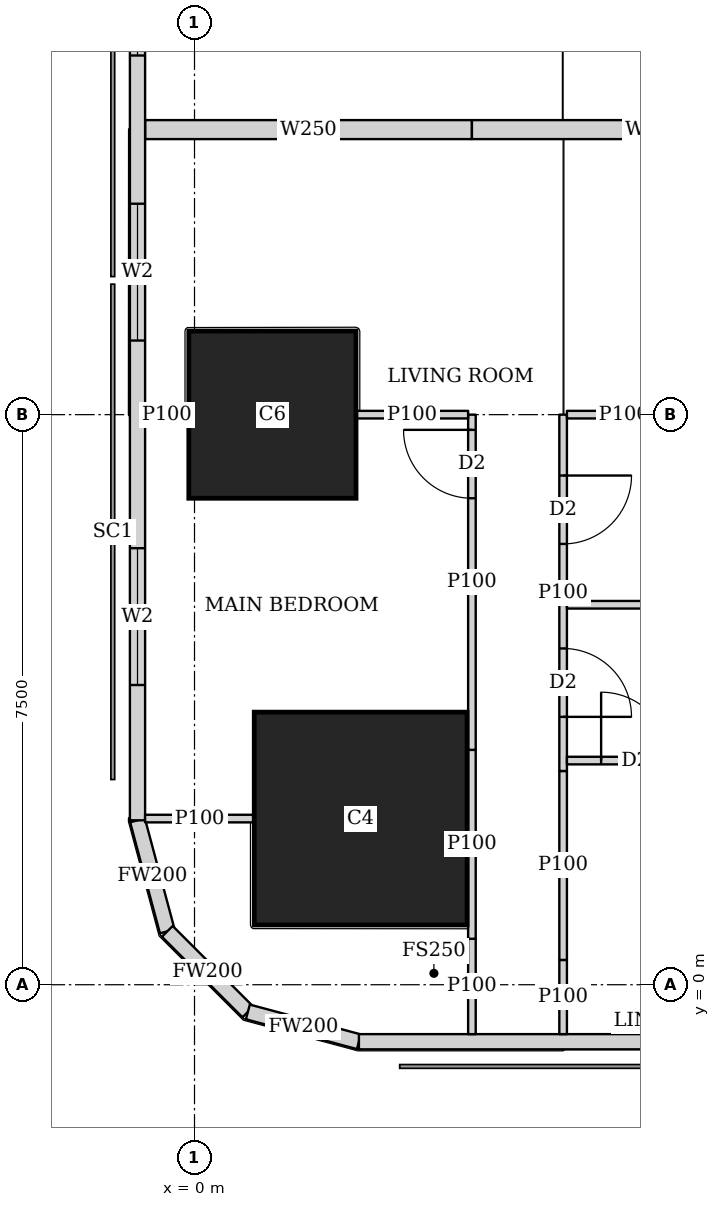
"""IFC4 building model, lengths in metres.
Left out: names, types, materials, properties, quantities, classifications, styles, units other than length and angle.
Written with IfcOpenShell. Run it as: python <this file> out.ifc"""

import sys

from ifc_helpers import new_model, si_unit, direction, frame, frame_2d, origin, origin_2d, place, context, subcontext, project, spatial, rectangle, extrude, element, fill, save


model = new_model("IFC4")
c1 = context("Model", 3, precision=1e-05, world=origin(), true_north=direction((0.0, 1.0)))
c2 = subcontext(c1, "Body", "Model", "MODEL_VIEW")
j1 = project(units=[si_unit("LENGTHUNIT", "METRE"), si_unit("PLANEANGLEUNIT", "RADIAN")], contexts=[c1])
p1 = place(None, origin())
s1 = spatial("IfcSite", under=j1, at=p1, CompositionType="ELEMENT")
p2 = place(p1, origin())
s2 = spatial("IfcBuilding", under=s1, at=p2, CompositionType="ELEMENT")
p3 = place(p2, frame((0.0, 0.0, 111.65)))
s3 = spatial("IfcBuildingStorey", under=s2, at=p3, CompositionType="ELEMENT", Elevation=111.65)
p4 = place(p3, frame((2.186, 2.186, 0.0), z_axis=(0.0, 0.0, 1.0), x_axis=(1.0, 0.0, 0.0)))
e1 = element("IfcColumn", 1, at=p4, inside=s3, PredefinedType="COLUMN", context=c2, shape_type="SweptSolid", body=[
    extrude(rectangle(XDim=2.8, YDim=2.8, at=origin_2d()), origin(), (0.0, 0.0, 1.0), 3.75),
])
p5 = place(p3, frame((1.025, 7.5, 0.0), z_axis=(0.0, 0.0, 1.0), x_axis=(1.0, 0.0, 0.0)))
e2 = element("IfcColumn", 2, at=p5, inside=s3, PredefinedType="COLUMN", context=c2, shape_type="SweptSolid", body=[
    extrude(rectangle(XDim=2.2, YDim=2.2, at=origin_2d()), origin(), (0.0, 0.0, 1.0), 3.75),
])
p6 = place(p3, frame((2.163, -0.75, 0.0), z_axis=(0.0, 0.0, 1.0), x_axis=(1.0, 0.0, 0.0)))
e3 = element("IfcWall", 3, at=p6, inside=s3, PredefinedType="SOLIDWALL", context=c2, shape_type="SweptSolid", body=[
    extrude(rectangle(XDim=45.628, YDim=0.2, at=frame_2d((22.814, 0.0))), origin(), (0.0, 0.0, 1.0), 3.5),
])
p7 = place(p6, frame((9.537, 0.0, 0.9)))
e4 = element("IfcOpeningElement", 4, at=p7, cuts=e3, PredefinedType="OPENING", context=c2, shape_type="SweptSolid", body=[
    extrude(rectangle(XDim=1.8, YDim=1.5, at=frame_2d((0.9, 0.75))), frame((0.0, 0.11, 0.0), z_axis=(0.0, -1.0, 0.0), x_axis=(1.0, 0.0, 0.0)), (0.0, 0.0, 1.0), 0.22),
])
p8 = place(p6, frame((13.137, 0.0, 0.9)))
e5 = element("IfcOpeningElement", 5, at=p8, cuts=e3, PredefinedType="OPENING", context=c2, shape_type="SweptSolid", body=[
    extrude(rectangle(XDim=1.8, YDim=1.5, at=frame_2d((0.9, 0.75))), frame((0.0, 0.11, 0.0), z_axis=(0.0, -1.0, 0.0), x_axis=(1.0, 0.0, 0.0)), (0.0, 0.0, 1.0), 0.22),
])
p9 = place(p6, frame((16.737, 0.0, 0.9)))
e6 = element("IfcOpeningElement", 6, at=p9, cuts=e3, PredefinedType="OPENING", context=c2, shape_type="SweptSolid", body=[
    extrude(rectangle(XDim=1.8, YDim=1.5, at=frame_2d((0.9, 0.75))), frame((0.0, 0.11, 0.0), z_axis=(0.0, -1.0, 0.0), x_axis=(1.0, 0.0, 0.0)), (0.0, 0.0, 1.0), 0.22),
])
p10 = place(p6, frame((20.337, 0.0, 0.9)))
e7 = element("IfcOpeningElement", 7, at=p10, cuts=e3, PredefinedType="OPENING", context=c2, shape_type="SweptSolid", body=[
    extrude(rectangle(XDim=1.8, YDim=1.5, at=frame_2d((0.9, 0.75))), frame((0.0, 0.11, 0.0), z_axis=(0.0, -1.0, 0.0), x_axis=(1.0, 0.0, 0.0)), (0.0, 0.0, 1.0), 0.22),
])
p11 = place(p6, frame((23.937, 0.0, 0.9)))
e8 = element("IfcOpeningElement", 8, at=p11, cuts=e3, PredefinedType="OPENING", context=c2, shape_type="SweptSolid", body=[
    extrude(rectangle(XDim=1.8, YDim=1.5, at=frame_2d((0.9, 0.75))), frame((0.0, 0.11, 0.0), z_axis=(0.0, -1.0, 0.0), x_axis=(1.0, 0.0, 0.0)), (0.0, 0.0, 1.0), 0.22),
])
p12 = place(p6, frame((27.537, 0.0, 0.9)))
e9 = element("IfcOpeningElement", 9, at=p12, cuts=e3, PredefinedType="OPENING", context=c2, shape_type="SweptSolid", body=[
    extrude(rectangle(XDim=1.8, YDim=1.5, at=frame_2d((0.9, 0.75))), frame((0.0, 0.11, 0.0), z_axis=(0.0, -1.0, 0.0), x_axis=(1.0, 0.0, 0.0)), (0.0, 0.0, 1.0), 0.22),
])
p13 = place(p6, frame((31.137, 0.0, 0.9)))
e10 = element("IfcOpeningElement", 10, at=p13, cuts=e3, PredefinedType="OPENING", context=c2, shape_type="SweptSolid", body=[
    extrude(rectangle(XDim=1.8, YDim=1.5, at=frame_2d((0.9, 0.75))), frame((0.0, 0.11, 0.0), z_axis=(0.0, -1.0, 0.0), x_axis=(1.0, 0.0, 0.0)), (0.0, 0.0, 1.0), 0.22),
])
p14 = place(p6, frame((34.737, 0.0, 0.9)))
e11 = element("IfcOpeningElement", 11, at=p14, cuts=e3, PredefinedType="OPENING", context=c2, shape_type="SweptSolid", body=[
    extrude(rectangle(XDim=1.8, YDim=1.5, at=frame_2d((0.9, 0.75))), frame((0.0, 0.11, 0.0), z_axis=(0.0, -1.0, 0.0), x_axis=(1.0, 0.0, 0.0)), (0.0, 0.0, 1.0), 0.22),
])
p15 = place(p3, frame((-0.75, 42.837, 0.0), z_axis=(0.0, 0.0, 1.0), x_axis=(0.0, -1.0, 0.0)))
e12 = element("IfcWall", 12, at=p15, inside=s3, PredefinedType="SOLIDWALL", context=c2, shape_type="SweptSolid", body=[
    extrude(rectangle(XDim=40.674, YDim=0.2, at=frame_2d((20.337, 0.0))), origin(), (0.0, 0.0, 1.0), 3.5),
])
p16 = place(p15, frame((1.78, 0.0, 0.9)))
e13 = element("IfcOpeningElement", 13, at=p16, cuts=e12, PredefinedType="OPENING", context=c2, shape_type="SweptSolid", body=[
    extrude(rectangle(XDim=1.8, YDim=1.5, at=frame_2d((0.9, 0.75))), frame((0.0, 0.11, 0.0), z_axis=(0.0, -1.0, 0.0), x_axis=(1.0, 0.0, 0.0)), (0.0, 0.0, 1.0), 0.22),
])
p17 = place(p15, frame((6.312, 0.0, 0.9)))
e14 = element("IfcOpeningElement", 14, at=p17, cuts=e12, PredefinedType="OPENING", context=c2, shape_type="SweptSolid", body=[
    extrude(rectangle(XDim=1.8, YDim=1.5, at=frame_2d((0.9, 0.75))), frame((0.0, 0.11, 0.0), z_axis=(0.0, -1.0, 0.0), x_axis=(1.0, 0.0, 0.0)), (0.0, 0.0, 1.0), 0.22),
])
p18 = place(p15, frame((10.062, 0.0, 0.9)))
e15 = element("IfcOpeningElement", 15, at=p18, cuts=e12, PredefinedType="OPENING", context=c2, shape_type="SweptSolid", body=[
    extrude(rectangle(XDim=1.8, YDim=1.5, at=frame_2d((0.9, 0.75))), frame((0.0, 0.11, 0.0), z_axis=(0.0, -1.0, 0.0), x_axis=(1.0, 0.0, 0.0)), (0.0, 0.0, 1.0), 0.22),
])
p19 = place(p15, frame((13.812, 0.0, 0.9)))
e16 = element("IfcOpeningElement", 16, at=p19, cuts=e12, PredefinedType="OPENING", context=c2, shape_type="SweptSolid", body=[
    extrude(rectangle(XDim=1.8, YDim=1.5, at=frame_2d((0.9, 0.75))), frame((0.0, 0.11, 0.0), z_axis=(0.0, -1.0, 0.0), x_axis=(1.0, 0.0, 0.0)), (0.0, 0.0, 1.0), 0.22),
])
p20 = place(p15, frame((17.562, 0.0, 0.9)))
e17 = element("IfcOpeningElement", 17, at=p20, cuts=e12, PredefinedType="OPENING", context=c2, shape_type="SweptSolid", body=[
    extrude(rectangle(XDim=1.8, YDim=1.5, at=frame_2d((0.9, 0.75))), frame((0.0, 0.11, 0.0), z_axis=(0.0, -1.0, 0.0), x_axis=(1.0, 0.0, 0.0)), (0.0, 0.0, 1.0), 0.22),
])
p21 = place(p15, frame((21.312, 0.0, 0.9)))
e18 = element("IfcOpeningElement", 18, at=p21, cuts=e12, PredefinedType="OPENING", context=c2, shape_type="SweptSolid", body=[
    extrude(rectangle(XDim=1.8, YDim=1.5, at=frame_2d((0.9, 0.75))), frame((0.0, 0.11, 0.0), z_axis=(0.0, -1.0, 0.0), x_axis=(1.0, 0.0, 0.0)), (0.0, 0.0, 1.0), 0.22),
])
p22 = place(p15, frame((25.062, 0.0, 0.9)))
e19 = element("IfcOpeningElement", 19, at=p22, cuts=e12, PredefinedType="OPENING", context=c2, shape_type="SweptSolid", body=[
    extrude(rectangle(XDim=1.8, YDim=1.5, at=frame_2d((0.9, 0.75))), frame((0.0, 0.11, 0.0), z_axis=(0.0, -1.0, 0.0), x_axis=(1.0, 0.0, 0.0)), (0.0, 0.0, 1.0), 0.22),
])
p23 = place(p15, frame((28.812, 0.0, 0.9)))
e20 = element("IfcOpeningElement", 20, at=p23, cuts=e12, PredefinedType="OPENING", context=c2, shape_type="SweptSolid", body=[
    extrude(rectangle(XDim=1.8, YDim=1.5, at=frame_2d((0.9, 0.75))), frame((0.0, 0.11, 0.0), z_axis=(0.0, -1.0, 0.0), x_axis=(1.0, 0.0, 0.0)), (0.0, 0.0, 1.0), 0.22),
])
p24 = place(p15, frame((32.562, 0.0, 0.9)))
e21 = element("IfcOpeningElement", 21, at=p24, cuts=e12, PredefinedType="OPENING", context=c2, shape_type="SweptSolid", body=[
    extrude(rectangle(XDim=1.8, YDim=1.5, at=frame_2d((0.9, 0.75))), frame((0.0, 0.11, 0.0), z_axis=(0.0, -1.0, 0.0), x_axis=(1.0, 0.0, 0.0)), (0.0, 0.0, 1.0), 0.22),
])
p25 = place(p15, frame((37.094, 0.0, 0.9)))
e22 = element("IfcOpeningElement", 22, at=p25, cuts=e12, PredefinedType="OPENING", context=c2, shape_type="SweptSolid", body=[
    extrude(rectangle(XDim=1.8, YDim=1.5, at=frame_2d((0.9, 0.75))), frame((0.0, 0.11, 0.0), z_axis=(0.0, -1.0, 0.0), x_axis=(1.0, 0.0, 0.0)), (0.0, 0.0, 1.0), 0.22),
])
p26 = place(p3, frame((-0.75, 2.163, 0.0), z_axis=(0.0, 0.0, 1.0), x_axis=(0.259168954497, -0.965832000415, 0.0)))
e23 = element("IfcWall", 23, at=p26, inside=s3, PredefinedType="SOLIDWALL", context=c2, shape_type="SweptSolid", body=[
    extrude(rectangle(XDim=1.513, YDim=0.2, at=frame_2d((0.756, 0.0))), origin(), (0.0, 0.0, 1.0), 3.5),
])
p27 = place(p3, frame((-0.358, 0.702, 0.0), z_axis=(0.0, 0.0, 1.0), x_axis=(0.707106781187, -0.707106781187, 0.0)))
e24 = element("IfcWall", 24, at=p27, inside=s3, PredefinedType="SOLIDWALL", context=c2, shape_type="SweptSolid", body=[
    extrude(rectangle(XDim=1.499, YDim=0.2, at=frame_2d((0.75, 0.0))), origin(), (0.0, 0.0, 1.0), 3.5),
])
p28 = place(p3, frame((0.702, -0.358, 0.0), z_axis=(0.0, 0.0, 1.0), x_axis=(0.965832000415, -0.259168954497, 0.0)))
e25 = element("IfcWall", 25, at=p28, inside=s3, PredefinedType="SOLIDWALL", context=c2, shape_type="SweptSolid", body=[
    extrude(rectangle(XDim=1.513, YDim=0.2, at=frame_2d((0.756, 0.0))), origin(), (0.0, 0.0, 1.0), 3.5),
])
p29 = place(p3, frame((3.65, -0.65, 0.0), z_axis=(0.0, 0.0, 1.0), x_axis=(0.0, 1.0, 0.0)))
e26 = element("IfcWall", 26, at=p29, inside=s3, PredefinedType="PARTITIONING", context=c2, shape_type="SweptSolid", body=[
    extrude(rectangle(XDim=1.254, YDim=0.1, at=frame_2d((0.627, 0.0))), origin(), (0.0, 0.0, 1.0), 3.5),
])
p30 = place(p3, frame((3.65, 0.604, 0.0), z_axis=(0.0, 0.0, 1.0), x_axis=(0.0, 1.0, 0.0)))
e27 = element("IfcWall", 27, at=p30, inside=s3, PredefinedType="PARTITIONING", context=c2, shape_type="SweptSolid", body=[
    extrude(rectangle(XDim=2.486, YDim=0.1, at=frame_2d((1.243, 0.0))), origin(), (0.0, 0.0, 1.0), 2.05),
])
p31 = place(p3, frame((3.65, 3.09, 0.0), z_axis=(0.0, 0.0, 1.0), x_axis=(0.0, 1.0, 0.0)))
e28 = element("IfcWall", 28, at=p31, inside=s3, PredefinedType="PARTITIONING", context=c2, shape_type="SweptSolid", body=[
    extrude(rectangle(XDim=4.41, YDim=0.1, at=frame_2d((2.205, 0.0))), origin(), (0.0, 0.0, 1.0), 3.5),
])
p32 = place(p31, frame((3.31, 0.0, 0.0)))
e29 = element("IfcOpeningElement", 29, at=p32, cuts=e28, PredefinedType="OPENING", context=c2, shape_type="SweptSolid", body=[
    extrude(rectangle(XDim=0.9, YDim=2.1, at=frame_2d((0.45, 1.05))), frame((0.0, 0.06, 0.0), z_axis=(0.0, -1.0, 0.0), x_axis=(1.0, 0.0, 0.0)), (0.0, 0.0, 1.0), 0.12),
])
p33 = place(p3, frame((4.85, -0.65, 0.0), z_axis=(0.0, 0.0, 1.0), x_axis=(0.0, 1.0, 0.0)))
e30 = element("IfcWall", 30, at=p33, inside=s3, PredefinedType="PARTITIONING", context=c2, shape_type="SweptSolid", body=[
    extrude(rectangle(XDim=0.976, YDim=0.1, at=frame_2d((0.488, 0.0))), origin(), (0.0, 0.0, 1.0), 3.5),
])
p34 = place(p3, frame((4.85, 0.326, 0.0), z_axis=(0.0, 0.0, 1.0), x_axis=(0.0, 1.0, 0.0)))
e31 = element("IfcWall", 31, at=p34, inside=s3, PredefinedType="PARTITIONING", context=c2, shape_type="SweptSolid", body=[
    extrude(rectangle(XDim=2.486, YDim=0.1, at=frame_2d((1.243, 0.0))), origin(), (0.0, 0.0, 1.0), 2.05),
])
p35 = place(p3, frame((4.85, 2.812, 0.0), z_axis=(0.0, 0.0, 1.0), x_axis=(0.0, 1.0, 0.0)))
e32 = element("IfcWall", 32, at=p35, inside=s3, PredefinedType="PARTITIONING", context=c2, shape_type="SweptSolid", body=[
    extrude(rectangle(XDim=4.688, YDim=0.1, at=frame_2d((2.344, 0.0))), origin(), (0.0, 0.0, 1.0), 3.5),
])
p36 = place(p35, frame((2.987, 0.0, 0.0)))
e33 = element("IfcOpeningElement", 33, at=p36, cuts=e32, PredefinedType="OPENING", context=c2, shape_type="SweptSolid", body=[
    extrude(rectangle(XDim=0.9, YDim=2.1, at=frame_2d((0.45, 1.05))), frame((0.0, 0.06, 0.0), z_axis=(0.0, -1.0, 0.0), x_axis=(1.0, 0.0, 0.0)), (0.0, 0.0, 1.0), 0.12),
])
p37 = place(p35, frame((0.712, 0.0, 0.0)))
e34 = element("IfcOpeningElement", 34, at=p37, cuts=e32, PredefinedType="OPENING", context=c2, shape_type="SweptSolid", body=[
    extrude(rectangle(XDim=0.9, YDim=2.1, at=frame_2d((0.45, 1.05))), frame((0.0, 0.06, 0.0), z_axis=(0.0, -1.0, 0.0), x_axis=(1.0, 0.0, 0.0)), (0.0, 0.0, 1.0), 0.12),
])
p38 = place(p3, frame((-0.65, 2.186, 0.0), z_axis=(0.0, 0.0, 1.0), x_axis=(1.0, 0.0, 0.0)))
e35 = element("IfcWall", 35, at=p38, inside=s3, PredefinedType="PARTITIONING", context=c2, shape_type="SweptSolid", body=[
    extrude(rectangle(XDim=1.435, YDim=0.1, at=frame_2d((0.717, 0.0))), origin(), (0.0, 0.0, 1.0), 3.5),
])
p39 = place(p3, frame((-0.65, 7.5, 0.0), z_axis=(0.0, 0.0, 1.0), x_axis=(1.0, 0.0, 0.0)))
e36 = element("IfcWall", 36, at=p39, inside=s3, PredefinedType="PARTITIONING", context=c2, shape_type="SweptSolid", body=[
    extrude(rectangle(XDim=0.574, YDim=0.1, at=frame_2d((0.287, 0.0))), origin(), (0.0, 0.0, 1.0), 2.05),
])
p40 = place(p3, frame((2.126, 7.5, 0.0), z_axis=(0.0, 0.0, 1.0), x_axis=(1.0, 0.0, 0.0)))
e37 = element("IfcWall", 37, at=p40, inside=s3, PredefinedType="PARTITIONING", context=c2, shape_type="SweptSolid", body=[
    extrude(rectangle(XDim=1.474, YDim=0.1, at=frame_2d((0.737, 0.0))), origin(), (0.0, 0.0, 1.0), 2.05),
])
p41 = place(p3, frame((4.9, 4.999, 0.0), z_axis=(0.0, 0.0, 1.0), x_axis=(1.0, 0.0, 0.0)))
e38 = element("IfcWall", 38, at=p41, inside=s3, PredefinedType="PARTITIONING", context=c2, shape_type="SweptSolid", body=[
    extrude(rectangle(XDim=3.525, YDim=0.1, at=frame_2d((1.763, 0.0))), origin(), (0.0, 0.0, 1.0), 3.5),
])
p42 = place(p3, frame((4.9, 7.5, 0.0), z_axis=(0.0, 0.0, 1.0), x_axis=(1.0, 0.0, 0.0)))
e39 = element("IfcWall", 39, at=p42, inside=s3, PredefinedType="PARTITIONING", context=c2, shape_type="SweptSolid", body=[
    extrude(rectangle(XDim=1.499, YDim=0.1, at=frame_2d((0.75, 0.0))), origin(), (0.0, 0.0, 1.0), 3.5),
])
p43 = place(p3, frame((4.9, 2.949, 0.0), z_axis=(0.0, 0.0, 1.0), x_axis=(1.0, 0.0, 0.0)))
e40 = element("IfcWall", 40, at=p43, inside=s3, PredefinedType="PARTITIONING", context=c2, shape_type="SweptSolid", body=[
    extrude(rectangle(XDim=3.525, YDim=0.1, at=frame_2d((1.763, 0.0))), origin(), (0.0, 0.0, 1.0), 3.5),
])
p44 = place(p43, frame((0.45, 0.0, 0.0)))
e41 = element("IfcOpeningElement", 41, at=p44, cuts=e40, PredefinedType="OPENING", context=c2, shape_type="SweptSolid", body=[
    extrude(rectangle(XDim=0.9, YDim=2.1, at=frame_2d((0.45, 1.05))), frame((0.0, 0.06, 0.0), z_axis=(0.0, -1.0, 0.0), x_axis=(1.0, 0.0, 0.0)), (0.0, 0.0, 1.0), 0.12),
])
p45 = place(p3, frame((-0.65, 11.25, 0.0), z_axis=(0.0, 0.0, 1.0), x_axis=(1.0, 0.0, 0.0)))
e42 = element("IfcWall", 42, at=p45, inside=s3, PredefinedType="SOLIDWALL", context=c2, shape_type="SweptSolid", body=[
    extrude(rectangle(XDim=4.3, YDim=0.25, at=frame_2d((2.15, 0.0))), origin(), (0.0, 0.0, 1.0), 2.2),
])
p46 = place(p3, frame((3.65, 11.25, 0.0), z_axis=(0.0, 0.0, 1.0), x_axis=(1.0, 0.0, 0.0)))
e43 = element("IfcWall", 43, at=p46, inside=s3, PredefinedType="SOLIDWALL", context=c2, shape_type="SweptSolid", body=[
    extrude(rectangle(XDim=4.775, YDim=0.25, at=frame_2d((2.388, 0.0))), origin(), (0.0, 0.0, 1.0), 3.5),
])
p47 = place(p23, origin())
e44 = element("IfcWindow", 44, at=p47, inside=s3, PartitioningType="SINGLE_PANEL", PredefinedType="WINDOW", context=c2, shape_type="SweptSolid", body=[
    extrude(rectangle(XDim=1.8, YDim=1.5, at=frame_2d((0.9, 0.75))), frame((0.0, 0.03, 0.0), z_axis=(0.0, -1.0, 0.0), x_axis=(1.0, 0.0, 0.0)), (0.0, 0.0, 1.0), 0.06),
])
fill(e20, e44)
p48 = place(p24, origin())
e45 = element("IfcWindow", 45, at=p48, inside=s3, PartitioningType="SINGLE_PANEL", PredefinedType="WINDOW", context=c2, shape_type="SweptSolid", body=[
    extrude(rectangle(XDim=1.8, YDim=1.5, at=frame_2d((0.9, 0.75))), frame((0.0, 0.03, 0.0), z_axis=(0.0, -1.0, 0.0), x_axis=(1.0, 0.0, 0.0)), (0.0, 0.0, 1.0), 0.06),
])
fill(e21, e45)
p49 = place(p25, origin())
e46 = element("IfcWindow", 46, at=p49, inside=s3, PartitioningType="SINGLE_PANEL", PredefinedType="WINDOW", context=c2, shape_type="SweptSolid", body=[
    extrude(rectangle(XDim=1.8, YDim=1.5, at=frame_2d((0.9, 0.75))), frame((0.0, 0.03, 0.0), z_axis=(0.0, -1.0, 0.0), x_axis=(1.0, 0.0, 0.0)), (0.0, 0.0, 1.0), 0.06),
])
fill(e22, e46)
p50 = place(p32, origin())
e47 = element("IfcDoor", 47, at=p50, inside=s3, OperationType="SINGLE_SWING_RIGHT", PredefinedType="DOOR", context=c2, shape_type="SweptSolid", body=[
    extrude(rectangle(XDim=0.9, YDim=2.1, at=frame_2d((0.45, 1.05))), frame((0.0, 0.025, 0.0), z_axis=(0.0, -1.0, 0.0), x_axis=(1.0, 0.0, 0.0)), (0.0, 0.0, 1.0), 0.05),
])
fill(e29, e47)
p51 = place(p36, origin())
e48 = element("IfcDoor", 48, at=p51, inside=s3, OperationType="SINGLE_SWING_LEFT", PredefinedType="DOOR", context=c2, shape_type="SweptSolid", body=[
    extrude(rectangle(XDim=0.9, YDim=2.1, at=frame_2d((0.45, 1.05))), frame((0.0, 0.025, 0.0), z_axis=(0.0, -1.0, 0.0), x_axis=(1.0, 0.0, 0.0)), (0.0, 0.0, 1.0), 0.05),
])
fill(e33, e48)
p52 = place(p37, origin())
e49 = element("IfcDoor", 49, at=p52, inside=s3, OperationType="SINGLE_SWING_RIGHT", PredefinedType="DOOR", context=c2, shape_type="SweptSolid", body=[
    extrude(rectangle(XDim=0.9, YDim=2.1, at=frame_2d((0.45, 1.05))), frame((0.0, 0.025, 0.0), z_axis=(0.0, -1.0, 0.0), x_axis=(1.0, 0.0, 0.0)), (0.0, 0.0, 1.0), 0.05),
])
fill(e34, e49)
p53 = place(p44, origin())
e50 = element("IfcDoor", 50, at=p53, inside=s3, OperationType="SINGLE_SWING_LEFT", PredefinedType="DOOR", context=c2, shape_type="SweptSolid", body=[
    extrude(rectangle(XDim=0.9, YDim=2.1, at=frame_2d((0.45, 1.05))), frame((0.0, 0.025, 0.0), z_axis=(0.0, -1.0, 0.0), x_axis=(1.0, 0.0, 0.0)), (0.0, 0.0, 1.0), 0.05),
])
fill(e41, e50)
save(model, sys.argv[1])
